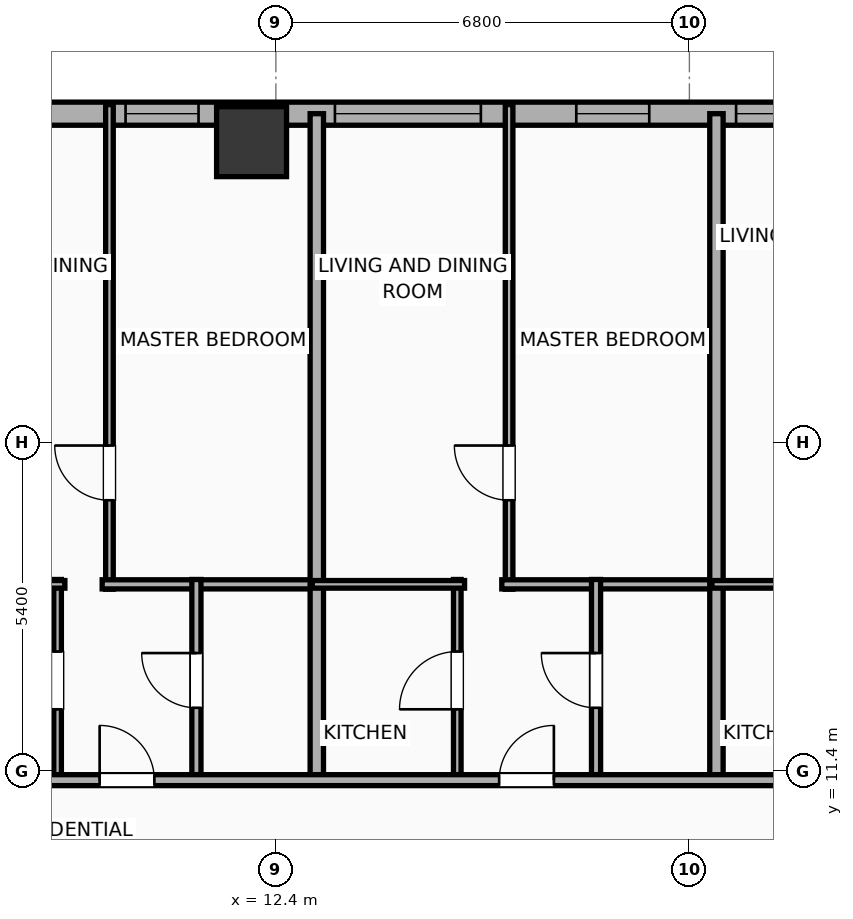
"""IFC4 building model, lengths in metres.
Left out: names, types, materials, properties, quantities, classifications, styles, units other than length and angle.
Written with IfcOpenShell. Run it as: python <this file> out.ifc"""

import sys

from ifc_helpers import new_model, si_unit, direction, frame, frame_2d, origin, origin_2d, place, context, subcontext, project, spatial, rectangle, hollow_rectangle, extrude, element, fill, save


model = new_model("IFC4")
c1 = context("Model", 3, precision=1e-05, world=origin(), true_north=direction((0.0, 1.0)))
c2 = subcontext(c1, "Body", "Model", "MODEL_VIEW")
j1 = project(units=[si_unit("LENGTHUNIT", "METRE"), si_unit("PLANEANGLEUNIT", "RADIAN")], contexts=[c1])
p1 = place(None, origin())
s1 = spatial("IfcSite", under=j1, at=p1, CompositionType="ELEMENT")
p2 = place(p1, origin())
s2 = spatial("IfcBuilding", under=s1, at=p2, CompositionType="ELEMENT")
p3 = place(p2, frame((0.0, 0.0, 76.7)))
s3 = spatial("IfcBuildingStorey", under=s2, at=p3, CompositionType="ELEMENT", Elevation=76.7)
p4 = place(p3, frame((12.0, 21.75, 0.0), z_axis=(0.0, 0.0, 1.0), x_axis=(1.0, 0.0, 0.0)))
e1 = element("IfcColumn", 1, at=p4, inside=s3, PredefinedType="COLUMN", context=c2, shape_type="SweptSolid", body=[
    extrude(hollow_rectangle(XDim=1.15, YDim=1.15, WallThickness=0.04, at=origin_2d()), origin(), (0.0, 0.0, 1.0), 3.9),
])
p5 = place(p3, frame((-29.581, 22.21, 0.0), z_axis=(0.0, 0.0, 1.0), x_axis=(1.0, 0.0, 0.0)))
e2 = element("IfcWall", 2, at=p5, inside=s3, PredefinedType="ELEMENTEDWALL", context=c2, shape_type="SweptSolid", body=[
    extrude(rectangle(XDim=51.963, YDim=0.38, at=frame_2d((25.981, 0.0))), origin(), (0.0, 0.0, 1.0), 3.6),
])
p6 = place(p5, frame((25.631, 0.0, 0.75)))
e3 = element("IfcOpeningElement", 3, at=p6, cuts=e2, PredefinedType="OPENING", context=c2, shape_type="SweptSolid", body=[
    extrude(rectangle(XDim=2.4, YDim=2.1, at=frame_2d((1.2, 1.05))), frame((0.0, 0.2, 0.0), z_axis=(0.0, -1.0, 0.0), x_axis=(1.0, 0.0, 0.0)), (0.0, 0.0, 1.0), 0.4),
])
p7 = place(p5, frame((42.952, 0.0, 0.75)))
e4 = element("IfcOpeningElement", 4, at=p7, cuts=e2, PredefinedType="OPENING", context=c2, shape_type="SweptSolid", body=[
    extrude(rectangle(XDim=2.4, YDim=2.1, at=frame_2d((1.2, 1.05))), frame((0.0, 0.2, 0.0), z_axis=(0.0, -1.0, 0.0), x_axis=(1.0, 0.0, 0.0)), (0.0, 0.0, 1.0), 0.4),
])
p8 = place(p5, frame((1.406, 0.0, 0.75)))
e5 = element("IfcOpeningElement", 5, at=p8, cuts=e2, PredefinedType="OPENING", context=c2, shape_type="SweptSolid", body=[
    extrude(rectangle(XDim=1.2, YDim=2.05, at=frame_2d((0.6, 1.025))), frame((0.0, 0.2, 0.0), z_axis=(0.0, -1.0, 0.0), x_axis=(1.0, 0.0, 0.0)), (0.0, 0.0, 1.0), 0.4),
])
p9 = place(p5, frame((4.297, 0.0, 0.75)))
e6 = element("IfcOpeningElement", 6, at=p9, cuts=e2, PredefinedType="OPENING", context=c2, shape_type="SweptSolid", body=[
    extrude(rectangle(XDim=1.2, YDim=2.05, at=frame_2d((0.6, 1.025))), frame((0.0, 0.2, 0.0), z_axis=(0.0, -1.0, 0.0), x_axis=(1.0, 0.0, 0.0)), (0.0, 0.0, 1.0), 0.4),
])
p10 = place(p5, frame((7.776, 0.0, 0.75)))
e7 = element("IfcOpeningElement", 7, at=p10, cuts=e2, PredefinedType="OPENING", context=c2, shape_type="SweptSolid", body=[
    extrude(rectangle(XDim=1.2, YDim=2.05, at=frame_2d((0.6, 1.025))), frame((0.0, 0.2, 0.0), z_axis=(0.0, -1.0, 0.0), x_axis=(1.0, 0.0, 0.0)), (0.0, 0.0, 1.0), 0.4),
])
p11 = place(p5, frame((14.036, 0.0, 0.75)))
e8 = element("IfcOpeningElement", 8, at=p11, cuts=e2, PredefinedType="OPENING", context=c2, shape_type="SweptSolid", body=[
    extrude(rectangle(XDim=1.2, YDim=2.05, at=frame_2d((0.6, 1.025))), frame((0.0, 0.2, 0.0), z_axis=(0.0, -1.0, 0.0), x_axis=(1.0, 0.0, 0.0)), (0.0, 0.0, 1.0), 0.4),
])
p12 = place(p5, frame((11.146, 0.0, 0.75)))
e9 = element("IfcOpeningElement", 9, at=p12, cuts=e2, PredefinedType="OPENING", context=c2, shape_type="SweptSolid", body=[
    extrude(rectangle(XDim=1.2, YDim=2.05, at=frame_2d((0.6, 1.025))), frame((0.0, 0.2, 0.0), z_axis=(0.0, -1.0, 0.0), x_axis=(1.0, 0.0, 0.0)), (0.0, 0.0, 1.0), 0.4),
])
p13 = place(p5, frame((18.751, 0.0, 0.75)))
e10 = element("IfcOpeningElement", 10, at=p13, cuts=e2, PredefinedType="OPENING", context=c2, shape_type="SweptSolid", body=[
    extrude(rectangle(XDim=1.2, YDim=2.05, at=frame_2d((0.6, 1.025))), frame((0.0, 0.2, 0.0), z_axis=(0.0, -1.0, 0.0), x_axis=(1.0, 0.0, 0.0)), (0.0, 0.0, 1.0), 0.4),
])
p14 = place(p5, frame((23.647, 0.0, 0.75)))
e11 = element("IfcOpeningElement", 11, at=p14, cuts=e2, PredefinedType="OPENING", context=c2, shape_type="SweptSolid", body=[
    extrude(rectangle(XDim=1.2, YDim=2.05, at=frame_2d((0.6, 1.025))), frame((0.0, 0.2, 0.0), z_axis=(0.0, -1.0, 0.0), x_axis=(1.0, 0.0, 0.0)), (0.0, 0.0, 1.0), 0.4),
])
p15 = place(p5, frame((32.006, 0.0, 0.75)))
e12 = element("IfcOpeningElement", 12, at=p15, cuts=e2, PredefinedType="OPENING", context=c2, shape_type="SweptSolid", body=[
    extrude(rectangle(XDim=1.2, YDim=2.05, at=frame_2d((0.6, 1.025))), frame((0.0, 0.2, 0.0), z_axis=(0.0, -1.0, 0.0), x_axis=(1.0, 0.0, 0.0)), (0.0, 0.0, 1.0), 0.4),
])
p16 = place(p5, frame((34.176, 0.0, 0.75)))
e13 = element("IfcOpeningElement", 13, at=p16, cuts=e2, PredefinedType="OPENING", context=c2, shape_type="SweptSolid", body=[
    extrude(rectangle(XDim=1.2, YDim=2.05, at=frame_2d((0.6, 1.025))), frame((0.0, 0.2, 0.0), z_axis=(0.0, -1.0, 0.0), x_axis=(1.0, 0.0, 0.0)), (0.0, 0.0, 1.0), 0.4),
])
p17 = place(p5, frame((37.063, 0.0, 0.75)))
e14 = element("IfcOpeningElement", 14, at=p17, cuts=e2, PredefinedType="OPENING", context=c2, shape_type="SweptSolid", body=[
    extrude(rectangle(XDim=1.2, YDim=2.05, at=frame_2d((0.6, 1.025))), frame((0.0, 0.2, 0.0), z_axis=(0.0, -1.0, 0.0), x_axis=(1.0, 0.0, 0.0)), (0.0, 0.0, 1.0), 0.4),
])
p18 = place(p5, frame((39.509, 0.0, 0.75)))
e15 = element("IfcOpeningElement", 15, at=p18, cuts=e2, PredefinedType="OPENING", context=c2, shape_type="SweptSolid", body=[
    extrude(rectangle(XDim=1.2, YDim=2.05, at=frame_2d((0.6, 1.025))), frame((0.0, 0.2, 0.0), z_axis=(0.0, -1.0, 0.0), x_axis=(1.0, 0.0, 0.0)), (0.0, 0.0, 1.0), 0.4),
])
p19 = place(p5, frame((46.921, 0.0, 0.75)))
e16 = element("IfcOpeningElement", 16, at=p19, cuts=e2, PredefinedType="OPENING", context=c2, shape_type="SweptSolid", body=[
    extrude(rectangle(XDim=1.2, YDim=2.05, at=frame_2d((0.6, 1.025))), frame((0.0, 0.2, 0.0), z_axis=(0.0, -1.0, 0.0), x_axis=(1.0, 0.0, 0.0)), (0.0, 0.0, 1.0), 0.4),
])
p20 = place(p5, frame((49.55, 0.0, 0.75)))
e17 = element("IfcOpeningElement", 17, at=p20, cuts=e2, PredefinedType="OPENING", context=c2, shape_type="SweptSolid", body=[
    extrude(rectangle(XDim=1.2, YDim=2.05, at=frame_2d((0.6, 1.025))), frame((0.0, 0.2, 0.0), z_axis=(0.0, -1.0, 0.0), x_axis=(1.0, 0.0, 0.0)), (0.0, 0.0, 1.0), 0.4),
])
p21 = place(p3, frame((9.663, 14.39, 0.0), z_axis=(0.0, 0.0, 1.0), x_axis=(0.0, 1.0, 0.0)))
e18 = element("IfcWall", 18, at=p21, inside=s3, PredefinedType="PARTITIONING", context=c2, shape_type="SweptSolid", body=[
    extrude(rectangle(XDim=7.97, YDim=0.125, at=frame_2d((3.985, 0.0))), origin(), (0.0, 0.0, 1.0), 3.6),
])
p22 = place(p21, frame((1.463, 0.0, 0.0)))
e19 = element("IfcOpeningElement", 19, at=p22, cuts=e18, PredefinedType="OPENING", context=c2, shape_type="SweptSolid", body=[
    extrude(rectangle(XDim=0.9, YDim=2.05, at=frame_2d((0.45, 1.025))), frame((0.0, 0.073, 0.0), z_axis=(0.0, -1.0, 0.0), x_axis=(1.0, 0.0, 0.0)), (0.0, 0.0, 1.0), 0.145),
])
p23 = place(p3, frame((9.543, 14.47, 0.0), z_axis=(0.0, 0.0, 1.0), x_axis=(1.0, 0.0, 0.0)))
e20 = element("IfcWall", 20, at=p23, inside=s3, PredefinedType="PLUMBINGWALL", context=c2, shape_type="SweptSolid", body=[
    extrude(rectangle(XDim=3.605, YDim=0.15, at=frame_2d((1.802, 0.0))), origin(), (0.0, 0.0, 1.0), 3.6),
])
p24 = place(p3, frame((8.81, 11.23, 0.0), z_axis=(0.0, 0.0, 1.0), x_axis=(0.0, 1.0, 0.0)))
e21 = element("IfcWall", 21, at=p24, inside=s3, PredefinedType="PARTITIONING", context=c2, shape_type="SweptSolid", body=[
    extrude(rectangle(XDim=3.32, YDim=0.125, at=frame_2d((1.66, 0.0))), origin(), (0.0, 0.0, 1.0), 3.6),
])
p25 = place(p24, frame((1.185, 0.0, 0.0)))
e22 = element("IfcOpeningElement", 22, at=p25, cuts=e21, PredefinedType="OPENING", context=c2, shape_type="SweptSolid", body=[
    extrude(rectangle(XDim=0.95, YDim=2.05, at=frame_2d((0.475, 1.025))), frame((0.0, 0.073, 0.0), z_axis=(0.0, -1.0, 0.0), x_axis=(1.0, 0.0, 0.0)), (0.0, 0.0, 1.0), 0.145),
])
p26 = place(p3, frame((6.24, 14.47, 0.0), z_axis=(0.0, 0.0, 1.0), x_axis=(1.0, 0.0, 0.0)))
e23 = element("IfcWall", 23, at=p26, inside=s3, PredefinedType="PARTITIONING", context=c2, shape_type="SweptSolid", body=[
    extrude(rectangle(XDim=2.69, YDim=0.125, at=frame_2d((1.345, 0.0))), origin(), (0.0, 0.0, 1.0), 3.6),
])
p27 = place(p3, frame((11.093, 11.23, 0.0), z_axis=(0.0, 0.0, 1.0), x_axis=(0.0, 1.0, 0.0)))
e24 = element("IfcWall", 24, at=p27, inside=s3, PredefinedType="PLUMBINGWALL", context=c2, shape_type="SweptSolid", body=[
    extrude(rectangle(XDim=3.32, YDim=0.15, at=frame_2d((1.66, 0.0))), origin(), (0.0, 0.0, 1.0), 3.6),
])
p28 = place(p27, frame((1.21, 0.0, 0.0)))
e25 = element("IfcOpeningElement", 25, at=p28, cuts=e24, PredefinedType="OPENING", context=c2, shape_type="SweptSolid", body=[
    extrude(rectangle(XDim=0.9, YDim=2.05, at=frame_2d((0.45, 1.025))), frame((0.0, 0.085, 0.0), z_axis=(0.0, -1.0, 0.0), x_axis=(1.0, 0.0, 0.0)), (0.0, 0.0, 1.0), 0.17),
])
p29 = place(p3, frame((13.073, 11.17, 0.0), z_axis=(0.0, 0.0, 1.0), x_axis=(0.0, 1.0, 0.0)))
e26 = element("IfcWall", 26, at=p29, inside=s3, PredefinedType="PARTITIONING", context=c2, shape_type="SweptSolid", body=[
    extrude(rectangle(XDim=11.04, YDim=0.22, at=frame_2d((5.52, 0.0))), origin(), (0.0, 0.0, 1.0), 3.6),
])
p30 = place(p3, frame((16.235, 14.39, 0.0), z_axis=(0.0, 0.0, 1.0), x_axis=(0.0, 1.0, 0.0)))
e27 = element("IfcWall", 27, at=p30, inside=s3, PredefinedType="PARTITIONING", context=c2, shape_type="SweptSolid", body=[
    extrude(rectangle(XDim=7.97, YDim=0.125, at=frame_2d((3.985, 0.0))), origin(), (0.0, 0.0, 1.0), 3.6),
])
p31 = place(p30, frame((1.463, 0.0, 0.0)))
e28 = element("IfcOpeningElement", 28, at=p31, cuts=e27, PredefinedType="OPENING", context=c2, shape_type="SweptSolid", body=[
    extrude(rectangle(XDim=0.9, YDim=2.05, at=frame_2d((0.45, 1.025))), frame((0.0, 0.073, 0.0), z_axis=(0.0, -1.0, 0.0), x_axis=(1.0, 0.0, 0.0)), (0.0, 0.0, 1.0), 0.145),
])
p32 = place(p3, frame((16.115, 14.47, 0.0), z_axis=(0.0, 0.0, 1.0), x_axis=(1.0, 0.0, 0.0)))
e29 = element("IfcWall", 29, at=p32, inside=s3, PredefinedType="PLUMBINGWALL", context=c2, shape_type="SweptSolid", body=[
    extrude(rectangle(XDim=3.605, YDim=0.15, at=frame_2d((1.802, 0.0))), origin(), (0.0, 0.0, 1.0), 3.6),
])
p33 = place(p3, frame((15.383, 11.23, 0.0), z_axis=(0.0, 0.0, 1.0), x_axis=(0.0, 1.0, 0.0)))
e30 = element("IfcWall", 30, at=p33, inside=s3, PredefinedType="PARTITIONING", context=c2, shape_type="SweptSolid", body=[
    extrude(rectangle(XDim=3.32, YDim=0.125, at=frame_2d((1.66, 0.0))), origin(), (0.0, 0.0, 1.0), 3.6),
])
p34 = place(p33, frame((1.185, 0.0, 0.0)))
e31 = element("IfcOpeningElement", 31, at=p34, cuts=e30, PredefinedType="OPENING", context=c2, shape_type="SweptSolid", body=[
    extrude(rectangle(XDim=0.95, YDim=2.05, at=frame_2d((0.475, 1.025))), frame((0.0, 0.073, 0.0), z_axis=(0.0, -1.0, 0.0), x_axis=(1.0, 0.0, 0.0)), (0.0, 0.0, 1.0), 0.145),
])
p35 = place(p3, frame((12.998, 14.47, 0.0), z_axis=(0.0, 0.0, 1.0), x_axis=(1.0, 0.0, 0.0)))
e32 = element("IfcWall", 32, at=p35, inside=s3, PredefinedType="PARTITIONING", context=c2, shape_type="SweptSolid", body=[
    extrude(rectangle(XDim=2.505, YDim=0.125, at=frame_2d((1.252, 0.0))), origin(), (0.0, 0.0, 1.0), 3.6),
])
p36 = place(p3, frame((17.665, 11.23, 0.0), z_axis=(0.0, 0.0, 1.0), x_axis=(0.0, 1.0, 0.0)))
e33 = element("IfcWall", 33, at=p36, inside=s3, PredefinedType="PLUMBINGWALL", context=c2, shape_type="SweptSolid", body=[
    extrude(rectangle(XDim=3.32, YDim=0.15, at=frame_2d((1.66, 0.0))), origin(), (0.0, 0.0, 1.0), 3.6),
])
p37 = place(p36, frame((1.21, 0.0, 0.0)))
e34 = element("IfcOpeningElement", 34, at=p37, cuts=e33, PredefinedType="OPENING", context=c2, shape_type="SweptSolid", body=[
    extrude(rectangle(XDim=0.9, YDim=2.05, at=frame_2d((0.45, 1.025))), frame((0.0, 0.085, 0.0), z_axis=(0.0, -1.0, 0.0), x_axis=(1.0, 0.0, 0.0)), (0.0, 0.0, 1.0), 0.17),
])
p38 = place(p3, frame((19.645, 11.17, 0.0), z_axis=(0.0, 0.0, 1.0), x_axis=(0.0, 1.0, 0.0)))
e35 = element("IfcWall", 35, at=p38, inside=s3, PredefinedType="PARTITIONING", context=c2, shape_type="SweptSolid", body=[
    extrude(rectangle(XDim=11.04, YDim=0.22, at=frame_2d((5.52, 0.0))), origin(), (0.0, 0.0, 1.0), 3.6),
])
p39 = place(p3, frame((19.57, 14.47, 0.0), z_axis=(0.0, 0.0, 1.0), x_axis=(1.0, 0.0, 0.0)))
e36 = element("IfcWall", 36, at=p39, inside=s3, PredefinedType="PARTITIONING", context=c2, shape_type="SweptSolid", body=[
    extrude(rectangle(XDim=2.505, YDim=0.125, at=frame_2d((1.252, 0.0))), origin(), (0.0, 0.0, 1.0), 3.6),
])
p40 = place(p3, frame((-33.41, 11.25, 0.0), z_axis=(0.0, 0.0, 1.0), x_axis=(1.0, 0.0, 0.0)))
e37 = element("IfcWall", 37, at=p40, inside=s3, PredefinedType="PARTITIONING", context=c2, shape_type="SweptSolid", body=[
    extrude(rectangle(XDim=59.62, YDim=0.18, at=frame_2d((29.81, 0.0))), origin(), (0.0, 0.0, 1.0), 3.6),
])
p41 = place(p40, frame((3.157, 0.0, 0.0)))
e38 = element("IfcOpeningElement", 38, at=p41, cuts=e37, PredefinedType="OPENING", context=c2, shape_type="SweptSolid", body=[
    extrude(rectangle(XDim=0.9, YDim=2.05, at=frame_2d((0.45, 1.025))), frame((0.0, 0.1, 0.0), z_axis=(0.0, -1.0, 0.0), x_axis=(1.0, 0.0, 0.0)), (0.0, 0.0, 1.0), 0.2),
])
p42 = place(p40, frame((10.145, 0.0, 0.0)))
e39 = element("IfcOpeningElement", 39, at=p42, cuts=e37, PredefinedType="OPENING", context=c2, shape_type="SweptSolid", body=[
    extrude(rectangle(XDim=0.9, YDim=2.05, at=frame_2d((0.45, 1.025))), frame((0.0, 0.1, 0.0), z_axis=(0.0, -1.0, 0.0), x_axis=(1.0, 0.0, 0.0)), (0.0, 0.0, 1.0), 0.2),
])
p43 = place(p40, frame((17.86, 0.0, 0.0)))
e40 = element("IfcOpeningElement", 40, at=p43, cuts=e37, PredefinedType="OPENING", context=c2, shape_type="SweptSolid", body=[
    extrude(rectangle(XDim=1.15, YDim=2.05, at=frame_2d((0.575, 1.025))), frame((0.0, 0.1, 0.0), z_axis=(0.0, -1.0, 0.0), x_axis=(1.0, 0.0, 0.0)), (0.0, 0.0, 1.0), 0.2),
])
p44 = place(p40, frame((23.338, 0.0, 0.0)))
e41 = element("IfcOpeningElement", 41, at=p44, cuts=e37, PredefinedType="OPENING", context=c2, shape_type="SweptSolid", body=[
    extrude(rectangle(XDim=0.9, YDim=2.05, at=frame_2d((0.45, 1.025))), frame((0.0, 0.1, 0.0), z_axis=(0.0, -1.0, 0.0), x_axis=(1.0, 0.0, 0.0)), (0.0, 0.0, 1.0), 0.2),
])
p45 = place(p40, frame((30.719, 0.0, 0.0)))
e42 = element("IfcOpeningElement", 42, at=p45, cuts=e37, PredefinedType="OPENING", context=c2, shape_type="SweptSolid", body=[
    extrude(rectangle(XDim=1.15, YDim=2.05, at=frame_2d((0.575, 1.025))), frame((0.0, 0.1, 0.0), z_axis=(0.0, -1.0, 0.0), x_axis=(1.0, 0.0, 0.0)), (0.0, 0.0, 1.0), 0.2),
])
p46 = place(p40, frame((34.81, 0.0, 0.0)))
e43 = element("IfcOpeningElement", 43, at=p46, cuts=e37, PredefinedType="OPENING", context=c2, shape_type="SweptSolid", body=[
    extrude(rectangle(XDim=1.15, YDim=2.05, at=frame_2d((0.575, 1.025))), frame((0.0, 0.1, 0.0), z_axis=(0.0, -1.0, 0.0), x_axis=(1.0, 0.0, 0.0)), (0.0, 0.0, 1.0), 0.2),
])
p47 = place(p40, frame((42.912, 0.0, 0.0)))
e44 = element("IfcOpeningElement", 44, at=p47, cuts=e37, PredefinedType="OPENING", context=c2, shape_type="SweptSolid", body=[
    extrude(rectangle(XDim=0.9, YDim=2.05, at=frame_2d((0.45, 1.025))), frame((0.0, 0.1, 0.0), z_axis=(0.0, -1.0, 0.0), x_axis=(1.0, 0.0, 0.0)), (0.0, 0.0, 1.0), 0.2),
])
p48 = place(p40, frame((49.482, 0.0, 0.0)))
e45 = element("IfcOpeningElement", 45, at=p48, cuts=e37, PredefinedType="OPENING", context=c2, shape_type="SweptSolid", body=[
    extrude(rectangle(XDim=0.9, YDim=2.05, at=frame_2d((0.45, 1.025))), frame((0.0, 0.1, 0.0), z_axis=(0.0, -1.0, 0.0), x_axis=(1.0, 0.0, 0.0)), (0.0, 0.0, 1.0), 0.2),
])
p49 = place(p40, frame((56.088, 0.0, 0.0)))
e46 = element("IfcOpeningElement", 46, at=p49, cuts=e37, PredefinedType="OPENING", context=c2, shape_type="SweptSolid", body=[
    extrude(rectangle(XDim=0.9, YDim=2.05, at=frame_2d((0.45, 1.025))), frame((0.0, 0.1, 0.0), z_axis=(0.0, -1.0, 0.0), x_axis=(1.0, 0.0, 0.0)), (0.0, 0.0, 1.0), 0.2),
])
p50 = place(p7, origin())
e47 = element("IfcWindow", 47, at=p50, inside=s3, PartitioningType="SINGLE_PANEL", PredefinedType="WINDOW", context=c2, shape_type="SweptSolid", body=[
    extrude(rectangle(XDim=2.4, YDim=2.1, at=frame_2d((1.2, 1.05))), frame((0.0, 0.03, 0.0), z_axis=(0.0, -1.0, 0.0), x_axis=(1.0, 0.0, 0.0)), (0.0, 0.0, 1.0), 0.06),
])
fill(e4, e47)
p51 = place(p18, origin())
e48 = element("IfcWindow", 48, at=p51, inside=s3, PartitioningType="SINGLE_PANEL", PredefinedType="WINDOW", context=c2, shape_type="SweptSolid", body=[
    extrude(rectangle(XDim=1.2, YDim=2.05, at=frame_2d((0.6, 1.025))), frame((0.0, 0.03, 0.0), z_axis=(0.0, -1.0, 0.0), x_axis=(1.0, 0.0, 0.0)), (0.0, 0.0, 1.0), 0.06),
])
fill(e15, e48)
p52 = place(p19, origin())
e49 = element("IfcWindow", 49, at=p52, inside=s3, PartitioningType="SINGLE_PANEL", PredefinedType="WINDOW", context=c2, shape_type="SweptSolid", body=[
    extrude(rectangle(XDim=1.2, YDim=2.05, at=frame_2d((0.6, 1.025))), frame((0.0, 0.03, 0.0), z_axis=(0.0, -1.0, 0.0), x_axis=(1.0, 0.0, 0.0)), (0.0, 0.0, 1.0), 0.06),
])
fill(e16, e49)
p53 = place(p20, origin())
e50 = element("IfcWindow", 50, at=p53, inside=s3, PartitioningType="SINGLE_PANEL", PredefinedType="WINDOW", context=c2, shape_type="SweptSolid", body=[
    extrude(rectangle(XDim=1.2, YDim=2.05, at=frame_2d((0.6, 1.025))), frame((0.0, 0.03, 0.0), z_axis=(0.0, -1.0, 0.0), x_axis=(1.0, 0.0, 0.0)), (0.0, 0.0, 1.0), 0.06),
])
fill(e17, e50)
p54 = place(p22, origin())
e51 = element("IfcDoor", 51, at=p54, inside=s3, OperationType="SINGLE_SWING_RIGHT", PredefinedType="DOOR", context=c2, shape_type="SweptSolid", body=[
    extrude(rectangle(XDim=0.9, YDim=2.05, at=frame_2d((0.45, 1.025))), frame((0.0, 0.025, 0.0), z_axis=(0.0, -1.0, 0.0), x_axis=(1.0, 0.0, 0.0)), (0.0, 0.0, 1.0), 0.05),
])
fill(e19, e51)
p55 = place(p25, origin())
e52 = element("IfcDoor", 52, at=p55, inside=s3, OperationType="SINGLE_SWING_LEFT", PredefinedType="DOOR", context=c2, shape_type="SweptSolid", body=[
    extrude(rectangle(XDim=0.95, YDim=2.05, at=frame_2d((0.475, 1.025))), frame((0.0, 0.025, 0.0), z_axis=(0.0, -1.0, 0.0), x_axis=(1.0, 0.0, 0.0)), (0.0, 0.0, 1.0), 0.05),
])
fill(e22, e52)
p56 = place(p28, origin())
e53 = element("IfcDoor", 53, at=p56, inside=s3, OperationType="SINGLE_SWING_RIGHT", PredefinedType="DOOR", context=c2, shape_type="SweptSolid", body=[
    extrude(rectangle(XDim=0.9, YDim=2.05, at=frame_2d((0.45, 1.025))), frame((0.0, 0.025, 0.0), z_axis=(0.0, -1.0, 0.0), x_axis=(1.0, 0.0, 0.0)), (0.0, 0.0, 1.0), 0.05),
])
fill(e25, e53)
p57 = place(p31, origin())
e54 = element("IfcDoor", 54, at=p57, inside=s3, OperationType="SINGLE_SWING_RIGHT", PredefinedType="DOOR", context=c2, shape_type="SweptSolid", body=[
    extrude(rectangle(XDim=0.9, YDim=2.05, at=frame_2d((0.45, 1.025))), frame((0.0, 0.025, 0.0), z_axis=(0.0, -1.0, 0.0), x_axis=(1.0, 0.0, 0.0)), (0.0, 0.0, 1.0), 0.05),
])
fill(e28, e54)
p58 = place(p34, origin())
e55 = element("IfcDoor", 55, at=p58, inside=s3, OperationType="SINGLE_SWING_LEFT", PredefinedType="DOOR", context=c2, shape_type="SweptSolid", body=[
    extrude(rectangle(XDim=0.95, YDim=2.05, at=frame_2d((0.475, 1.025))), frame((0.0, 0.025, 0.0), z_axis=(0.0, -1.0, 0.0), x_axis=(1.0, 0.0, 0.0)), (0.0, 0.0, 1.0), 0.05),
])
fill(e31, e55)
p59 = place(p37, origin())
e56 = element("IfcDoor", 56, at=p59, inside=s3, OperationType="SINGLE_SWING_RIGHT", PredefinedType="DOOR", context=c2, shape_type="SweptSolid", body=[
    extrude(rectangle(XDim=0.9, YDim=2.05, at=frame_2d((0.45, 1.025))), frame((0.0, 0.025, 0.0), z_axis=(0.0, -1.0, 0.0), x_axis=(1.0, 0.0, 0.0)), (0.0, 0.0, 1.0), 0.05),
])
fill(e34, e56)
p60 = place(p47, origin())
e57 = element("IfcDoor", 57, at=p60, inside=s3, OperationType="SINGLE_SWING_LEFT", PredefinedType="DOOR", context=c2, shape_type="SweptSolid", body=[
    extrude(rectangle(XDim=0.9, YDim=2.05, at=frame_2d((0.45, 1.025))), frame((0.0, 0.025, 0.0), z_axis=(0.0, -1.0, 0.0), x_axis=(1.0, 0.0, 0.0)), (0.0, 0.0, 1.0), 0.05),
])
fill(e44, e57)
p61 = place(p48, origin())
e58 = element("IfcDoor", 58, at=p61, inside=s3, OperationType="SINGLE_SWING_RIGHT", PredefinedType="DOOR", context=c2, shape_type="SweptSolid", body=[
    extrude(rectangle(XDim=0.9, YDim=2.05, at=frame_2d((0.45, 1.025))), frame((0.0, 0.025, 0.0), z_axis=(0.0, -1.0, 0.0), x_axis=(1.0, 0.0, 0.0)), (0.0, 0.0, 1.0), 0.05),
])
fill(e45, e58)
save(model, sys.argv[1])
